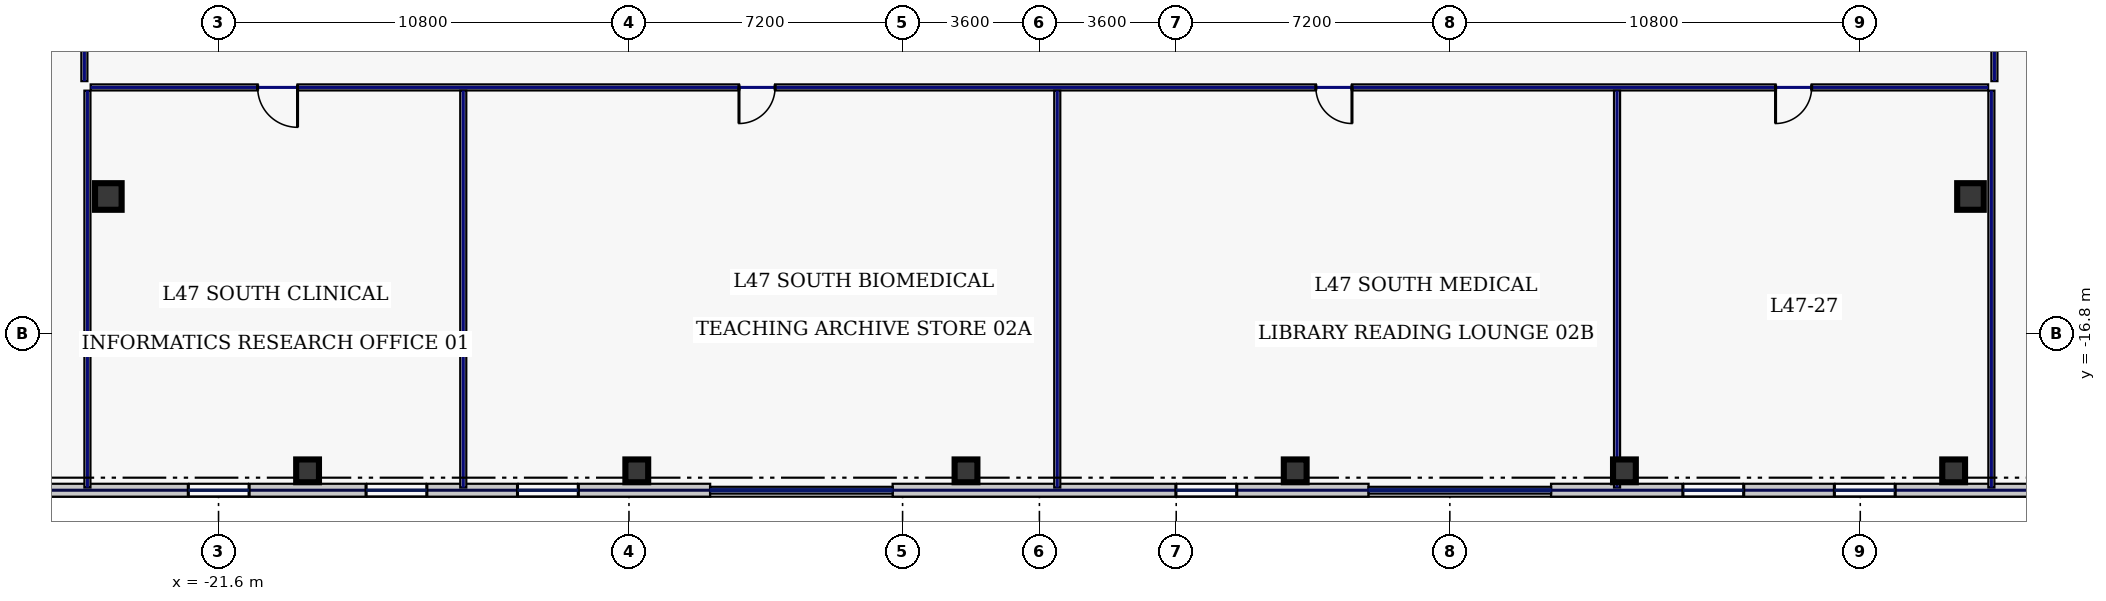
"""IFC4 building model, lengths in metres.
Left out: names, types, materials, properties, quantities, classifications, styles, units other than length and angle.
Written with IfcOpenShell. Run it as: python <this file> out.ifc"""

import sys

from ifc_helpers import new_model, si_unit, direction, frame, frame_2d, origin, origin_2d, place, context, subcontext, project, spatial, rectangle, hollow_rectangle, extrude, element, fill, save


model = new_model("IFC4")
c1 = context("Model", 3, precision=1e-05, world=origin(), true_north=direction((0.0, 1.0)))
c2 = subcontext(c1, "Body", "Model", "MODEL_VIEW")
j1 = project(units=[si_unit("LENGTHUNIT", "METRE"), si_unit("PLANEANGLEUNIT", "RADIAN")], contexts=[c1])
p1 = place(None, origin())
s1 = spatial("IfcSite", under=j1, at=p1, CompositionType="ELEMENT")
p2 = place(p1, origin())
s2 = spatial("IfcBuilding", under=s1, at=p2, CompositionType="ELEMENT")
p3 = place(p2, frame((0.0, 0.0, 204.2)))
s3 = spatial("IfcBuildingStorey", under=s2, at=p3, CompositionType="ELEMENT", Elevation=204.2)
for number, where, z_axis, x_axis in (
    (1, (-24.5, -13.2, 0.0), (0.0, 0.0, 1.0), (1.0, 0.0, 0.0)),
    (2, (24.5, -13.2, 0.0), (0.0, 0.0, 1.0), (1.0, 0.0, 0.0)),
):
    element("IfcColumn", number, at=place(p3, frame(where, z_axis=z_axis, x_axis=x_axis)), inside=s3, PredefinedType="COLUMN", context=c2, shape_type="SweptSolid", body=[
        extrude(hollow_rectangle(XDim=0.7, YDim=0.7, WallThickness=0.032, at=origin_2d()), origin(), (0.0, 0.0, 1.0), 3.68),
    ])
for number, where, z_axis, x_axis in (
    (3, (-19.257, -20.42, 0.0), (0.0, 0.0, 1.0), (1.0, 0.0, 0.0)),
    (4, (-10.594, -20.42, 0.0), (0.0, 0.0, 1.0), (1.0, 0.0, 0.0)),
    (5, (-1.931, -20.42, 0.0), (0.0, 0.0, 1.0), (1.0, 0.0, 0.0)),
    (6, (6.731, -20.42, 0.0), (0.0, 0.0, 1.0), (1.0, 0.0, 0.0)),
    (7, (15.394, -20.42, 0.0), (0.0, 0.0, 1.0), (1.0, 0.0, 0.0)),
    (8, (24.057, -20.42, 0.0), (0.0, 0.0, 1.0), (1.0, 0.0, 0.0)),
):
    element("IfcColumn", number, at=place(p3, frame(where, z_axis=z_axis, x_axis=x_axis)), inside=s3, PredefinedType="COLUMN", context=c2, shape_type="SweptSolid", body=[
        extrude(hollow_rectangle(XDim=0.6, YDim=0.6, WallThickness=0.028, at=origin_2d()), origin(), (0.0, 0.0, 1.0), 3.68),
    ])
p4 = place(p3, frame((-28.6, -20.93, 0.0), z_axis=(0.0, 0.0, 1.0), x_axis=(1.0, 0.0, 0.0)))
e9 = element("IfcWall", 9, at=p4, inside=s3, PredefinedType="STANDARD", context=c2, shape_type="SweptSolid", body=[
    extrude(rectangle(XDim=19.937, YDim=0.34, at=frame_2d((9.969, 0.0))), origin(), (0.0, 0.0, 1.0), 2.075),
])
p5 = place(p4, frame((6.204, 0.0, 0.22)))
e10 = element("IfcOpeningElement", 10, at=p5, cuts=e9, PredefinedType="OPENING", context=c2, shape_type="SweptSolid", body=[
    extrude(rectangle(XDim=1.6, YDim=1.2, at=frame_2d((0.8, 0.6))), frame((0.0, 0.18, 0.0), z_axis=(0.0, -1.0, 0.0), x_axis=(1.0, 0.0, 0.0)), (0.0, 0.0, 1.0), 0.36),
])
p6 = place(p4, frame((10.882, 0.0, 0.22)))
e11 = element("IfcOpeningElement", 11, at=p6, cuts=e9, PredefinedType="OPENING", context=c2, shape_type="SweptSolid", body=[
    extrude(rectangle(XDim=1.6, YDim=1.2, at=frame_2d((0.8, 0.6))), frame((0.0, 0.18, 0.0), z_axis=(0.0, -1.0, 0.0), x_axis=(1.0, 0.0, 0.0)), (0.0, 0.0, 1.0), 0.36),
])
p7 = place(p4, frame((14.867, 0.0, 0.22)))
e12 = element("IfcOpeningElement", 12, at=p7, cuts=e9, PredefinedType="OPENING", context=c2, shape_type="SweptSolid", body=[
    extrude(rectangle(XDim=1.6, YDim=1.2, at=frame_2d((0.8, 0.6))), frame((0.0, 0.18, 0.0), z_axis=(0.0, -1.0, 0.0), x_axis=(1.0, 0.0, 0.0)), (0.0, 0.0, 1.0), 0.36),
])
p8 = place(p3, frame((-3.863, -20.93, 0.0), z_axis=(0.0, 0.0, 1.0), x_axis=(1.0, 0.0, 0.0)))
e13 = element("IfcWall", 13, at=p8, inside=s3, PredefinedType="STANDARD", context=c2, shape_type="SweptSolid", body=[
    extrude(rectangle(XDim=12.526, YDim=0.34, at=frame_2d((6.263, 0.0))), origin(), (0.0, 0.0, 1.0), 3.68),
])
p9 = place(p8, frame((7.455, 0.0, 0.22)))
e14 = element("IfcOpeningElement", 14, at=p9, cuts=e13, PredefinedType="OPENING", context=c2, shape_type="SweptSolid", body=[
    extrude(rectangle(XDim=1.6, YDim=1.2, at=frame_2d((0.8, 0.6))), frame((0.0, 0.18, 0.0), z_axis=(0.0, -1.0, 0.0), x_axis=(1.0, 0.0, 0.0)), (0.0, 0.0, 1.0), 0.36),
])
p10 = place(p3, frame((13.463, -20.93, 0.0), z_axis=(0.0, 0.0, 1.0), x_axis=(1.0, 0.0, 0.0)))
e15 = element("IfcWall", 15, at=p10, inside=s3, PredefinedType="STANDARD", context=c2, shape_type="SweptSolid", body=[
    extrude(rectangle(XDim=19.937, YDim=0.34, at=frame_2d((9.969, 0.0))), origin(), (0.0, 0.0, 1.0), 3.68),
])
p11 = place(p10, frame((3.47, 0.0, 0.22)))
e16 = element("IfcOpeningElement", 16, at=p11, cuts=e15, PredefinedType="OPENING", context=c2, shape_type="SweptSolid", body=[
    extrude(rectangle(XDim=1.6, YDim=1.2, at=frame_2d((0.8, 0.6))), frame((0.0, 0.18, 0.0), z_axis=(0.0, -1.0, 0.0), x_axis=(1.0, 0.0, 0.0)), (0.0, 0.0, 1.0), 0.36),
])
p12 = place(p10, frame((7.455, 0.0, 0.22)))
e17 = element("IfcOpeningElement", 17, at=p12, cuts=e15, PredefinedType="OPENING", context=c2, shape_type="SweptSolid", body=[
    extrude(rectangle(XDim=1.6, YDim=1.2, at=frame_2d((0.8, 0.6))), frame((0.0, 0.18, 0.0), z_axis=(0.0, -1.0, 0.0), x_axis=(1.0, 0.0, 0.0)), (0.0, 0.0, 1.0), 0.36),
])
p13 = place(p10, frame((16.118, 0.0, 0.22)))
e18 = element("IfcOpeningElement", 18, at=p13, cuts=e15, PredefinedType="OPENING", context=c2, shape_type="SweptSolid", body=[
    extrude(rectangle(XDim=1.6, YDim=1.2, at=frame_2d((0.8, 0.6))), frame((0.0, 0.18, 0.0), z_axis=(0.0, -1.0, 0.0), x_axis=(1.0, 0.0, 0.0)), (0.0, 0.0, 1.0), 0.36),
])
p14 = place(p3, frame((-25.13, -10.165, 0.0), z_axis=(0.0, 0.0, 1.0), x_axis=(0.0, 1.0, 0.0)))
e19 = element("IfcWall", 19, at=p14, inside=s3, PredefinedType="PARTITIONING", context=c2, shape_type="SweptSolid", body=[
    extrude(rectangle(XDim=7.58, YDim=0.16, at=frame_2d((3.79, 0.0))), origin(), (0.0, 0.0, 1.0), 3.68),
])
p15 = place(p14, frame((6.04, 0.0, 0.0)))
e20 = element("IfcOpeningElement", 20, at=p15, cuts=e19, PredefinedType="OPENING", context=c2, shape_type="SweptSolid", body=[
    extrude(rectangle(XDim=0.95, YDim=2.2, at=frame_2d((0.475, 1.1))), frame((0.0, 0.09, 0.0), z_axis=(0.0, -1.0, 0.0), x_axis=(1.0, 0.0, 0.0)), (0.0, 0.0, 1.0), 0.18),
])
p16 = place(p3, frame((25.13, -7.185, 0.0), z_axis=(0.0, 0.0, 1.0), x_axis=(0.0, -1.0, 0.0)))
e21 = element("IfcWall", 21, at=p16, inside=s3, PredefinedType="PARTITIONING", context=c2, shape_type="SweptSolid", body=[
    extrude(rectangle(XDim=2.98, YDim=0.16, at=frame_2d((1.49, 0.0))), origin(), (0.0, 0.0, 1.0), 3.68),
])
p17 = place(p16, frame((1.1, 0.0, 0.0)))
e22 = element("IfcOpeningElement", 22, at=p17, cuts=e21, PredefinedType="OPENING", context=c2, shape_type="SweptSolid", body=[
    extrude(rectangle(XDim=0.95, YDim=2.2, at=frame_2d((0.475, 1.1))), frame((0.0, 0.09, 0.0), z_axis=(0.0, -1.0, 0.0), x_axis=(1.0, 0.0, 0.0)), (0.0, 0.0, 1.0), 0.18),
])
p18 = place(p3, frame((24.965, -10.33, 0.0), z_axis=(0.0, 0.0, 1.0), x_axis=(-1.0, 0.0, 0.0)))
e23 = element("IfcWall", 23, at=p18, inside=s3, PredefinedType="PARTITIONING", context=c2, shape_type="SweptSolid", body=[
    extrude(rectangle(XDim=49.93, YDim=0.16, at=frame_2d((24.965, 0.0))), origin(), (0.0, 0.0, 1.0), 3.68),
])
p19 = place(p18, frame((44.486, 0.0, 0.0)))
e24 = element("IfcOpeningElement", 24, at=p19, cuts=e23, PredefinedType="OPENING", context=c2, shape_type="SweptSolid", body=[
    extrude(rectangle(XDim=1.05, YDim=2.2, at=frame_2d((0.525, 1.1))), frame((0.0, 0.09, 0.0), z_axis=(0.0, -1.0, 0.0), x_axis=(1.0, 0.0, 0.0)), (0.0, 0.0, 1.0), 0.18),
])
p20 = place(p18, frame((31.92, 0.0, 0.0)))
e25 = element("IfcOpeningElement", 25, at=p20, cuts=e23, PredefinedType="OPENING", context=c2, shape_type="SweptSolid", body=[
    extrude(rectangle(XDim=0.95, YDim=2.2, at=frame_2d((0.475, 1.1))), frame((0.0, 0.09, 0.0), z_axis=(0.0, -1.0, 0.0), x_axis=(1.0, 0.0, 0.0)), (0.0, 0.0, 1.0), 0.18),
])
p21 = place(p18, frame((16.74, 0.0, 0.0)))
e26 = element("IfcOpeningElement", 26, at=p21, cuts=e23, PredefinedType="OPENING", context=c2, shape_type="SweptSolid", body=[
    extrude(rectangle(XDim=0.95, YDim=2.2, at=frame_2d((0.475, 1.1))), frame((0.0, 0.09, 0.0), z_axis=(0.0, -1.0, 0.0), x_axis=(1.0, 0.0, 0.0)), (0.0, 0.0, 1.0), 0.18),
])
p22 = place(p18, frame((4.644, 0.0, 0.0)))
e27 = element("IfcOpeningElement", 27, at=p22, cuts=e23, PredefinedType="OPENING", context=c2, shape_type="SweptSolid", body=[
    extrude(rectangle(XDim=0.95, YDim=2.2, at=frame_2d((0.475, 1.1))), frame((0.0, 0.09, 0.0), z_axis=(0.0, -1.0, 0.0), x_axis=(1.0, 0.0, 0.0)), (0.0, 0.0, 1.0), 0.18),
])
for number, where, z_axis, x_axis in (
    (28, (-25.05, -20.86, 0.0), (0.0, 0.0, 1.0), (0.0, 1.0, 0.0)),
    (29, (25.05, -20.86, 0.0), (0.0, 0.0, 1.0), (0.0, 1.0, 0.0)),
    (30, (-15.16, -20.86, 0.0), (0.0, 0.0, 1.0), (0.0, 1.0, 0.0)),
    (31, (15.2, -20.86, 0.0), (0.0, 0.0, 1.0), (0.0, 1.0, 0.0)),
    (32, (0.47, -20.86, 0.0), (0.0, 0.0, 1.0), (0.0, 1.0, 0.0)),
):
    element("IfcWall", number, at=place(p3, frame(where, z_axis=z_axis, x_axis=x_axis)), inside=s3, PredefinedType="PARTITIONING", context=c2, shape_type="SweptSolid", body=[
        extrude(rectangle(XDim=10.445, YDim=0.16, at=frame_2d((5.223, 0.0))), origin(), (0.0, 0.0, 1.0), 3.68),
    ])
p23 = place(p5, origin())
e33 = element("IfcWindow", 33, at=p23, inside=s3, PartitioningType="SINGLE_PANEL", PredefinedType="WINDOW", context=c2, shape_type="SweptSolid", body=[
    extrude(rectangle(XDim=1.6, YDim=1.2, at=frame_2d((0.8, 0.6))), frame((0.0, 0.03, 0.0), z_axis=(0.0, -1.0, 0.0), x_axis=(1.0, 0.0, 0.0)), (0.0, 0.0, 1.0), 0.06),
])
fill(e10, e33)
p24 = place(p6, origin())
e34 = element("IfcWindow", 34, at=p24, inside=s3, PartitioningType="SINGLE_PANEL", PredefinedType="WINDOW", context=c2, shape_type="SweptSolid", body=[
    extrude(rectangle(XDim=1.6, YDim=1.2, at=frame_2d((0.8, 0.6))), frame((0.0, 0.03, 0.0), z_axis=(0.0, -1.0, 0.0), x_axis=(1.0, 0.0, 0.0)), (0.0, 0.0, 1.0), 0.06),
])
fill(e11, e34)
p25 = place(p7, origin())
e35 = element("IfcWindow", 35, at=p25, inside=s3, PartitioningType="SINGLE_PANEL", PredefinedType="WINDOW", context=c2, shape_type="SweptSolid", body=[
    extrude(rectangle(XDim=1.6, YDim=1.2, at=frame_2d((0.8, 0.6))), frame((0.0, 0.03, 0.0), z_axis=(0.0, -1.0, 0.0), x_axis=(1.0, 0.0, 0.0)), (0.0, 0.0, 1.0), 0.06),
])
fill(e12, e35)
p26 = place(p9, origin())
e36 = element("IfcWindow", 36, at=p26, inside=s3, PartitioningType="SINGLE_PANEL", PredefinedType="WINDOW", context=c2, shape_type="SweptSolid", body=[
    extrude(rectangle(XDim=1.6, YDim=1.2, at=frame_2d((0.8, 0.6))), frame((0.0, 0.03, 0.0), z_axis=(0.0, -1.0, 0.0), x_axis=(1.0, 0.0, 0.0)), (0.0, 0.0, 1.0), 0.06),
])
fill(e14, e36)
p27 = place(p11, origin())
e37 = element("IfcWindow", 37, at=p27, inside=s3, PartitioningType="SINGLE_PANEL", PredefinedType="WINDOW", context=c2, shape_type="SweptSolid", body=[
    extrude(rectangle(XDim=1.6, YDim=1.2, at=frame_2d((0.8, 0.6))), frame((0.0, 0.03, 0.0), z_axis=(0.0, -1.0, 0.0), x_axis=(1.0, 0.0, 0.0)), (0.0, 0.0, 1.0), 0.06),
])
fill(e16, e37)
p28 = place(p12, origin())
e38 = element("IfcWindow", 38, at=p28, inside=s3, PartitioningType="SINGLE_PANEL", PredefinedType="WINDOW", context=c2, shape_type="SweptSolid", body=[
    extrude(rectangle(XDim=1.6, YDim=1.2, at=frame_2d((0.8, 0.6))), frame((0.0, 0.03, 0.0), z_axis=(0.0, -1.0, 0.0), x_axis=(1.0, 0.0, 0.0)), (0.0, 0.0, 1.0), 0.06),
])
fill(e17, e38)
p29 = place(p19, origin())
e39 = element("IfcDoor", 39, at=p29, inside=s3, OperationType="SINGLE_SWING_LEFT", PredefinedType="DOOR", context=c2, shape_type="SweptSolid", body=[
    extrude(rectangle(XDim=1.05, YDim=2.2, at=frame_2d((0.525, 1.1))), frame((0.0, 0.025, 0.0), z_axis=(0.0, -1.0, 0.0), x_axis=(1.0, 0.0, 0.0)), (0.0, 0.0, 1.0), 0.05),
])
fill(e24, e39)
p30 = place(p20, origin())
e40 = element("IfcDoor", 40, at=p30, inside=s3, OperationType="SINGLE_SWING_RIGHT", PredefinedType="DOOR", context=c2, shape_type="SweptSolid", body=[
    extrude(rectangle(XDim=0.95, YDim=2.2, at=frame_2d((0.475, 1.1))), frame((0.0, 0.025, 0.0), z_axis=(0.0, -1.0, 0.0), x_axis=(1.0, 0.0, 0.0)), (0.0, 0.0, 1.0), 0.05),
])
fill(e25, e40)
p31 = place(p21, origin())
e41 = element("IfcDoor", 41, at=p31, inside=s3, OperationType="SINGLE_SWING_LEFT", PredefinedType="DOOR", context=c2, shape_type="SweptSolid", body=[
    extrude(rectangle(XDim=0.95, YDim=2.2, at=frame_2d((0.475, 1.1))), frame((0.0, 0.025, 0.0), z_axis=(0.0, -1.0, 0.0), x_axis=(1.0, 0.0, 0.0)), (0.0, 0.0, 1.0), 0.05),
])
fill(e26, e41)
p32 = place(p22, origin())
e42 = element("IfcDoor", 42, at=p32, inside=s3, OperationType="SINGLE_SWING_RIGHT", PredefinedType="DOOR", context=c2, shape_type="SweptSolid", body=[
    extrude(rectangle(XDim=0.95, YDim=2.2, at=frame_2d((0.475, 1.1))), frame((0.0, 0.025, 0.0), z_axis=(0.0, -1.0, 0.0), x_axis=(1.0, 0.0, 0.0)), (0.0, 0.0, 1.0), 0.05),
])
fill(e27, e42)
save(model, sys.argv[1])
